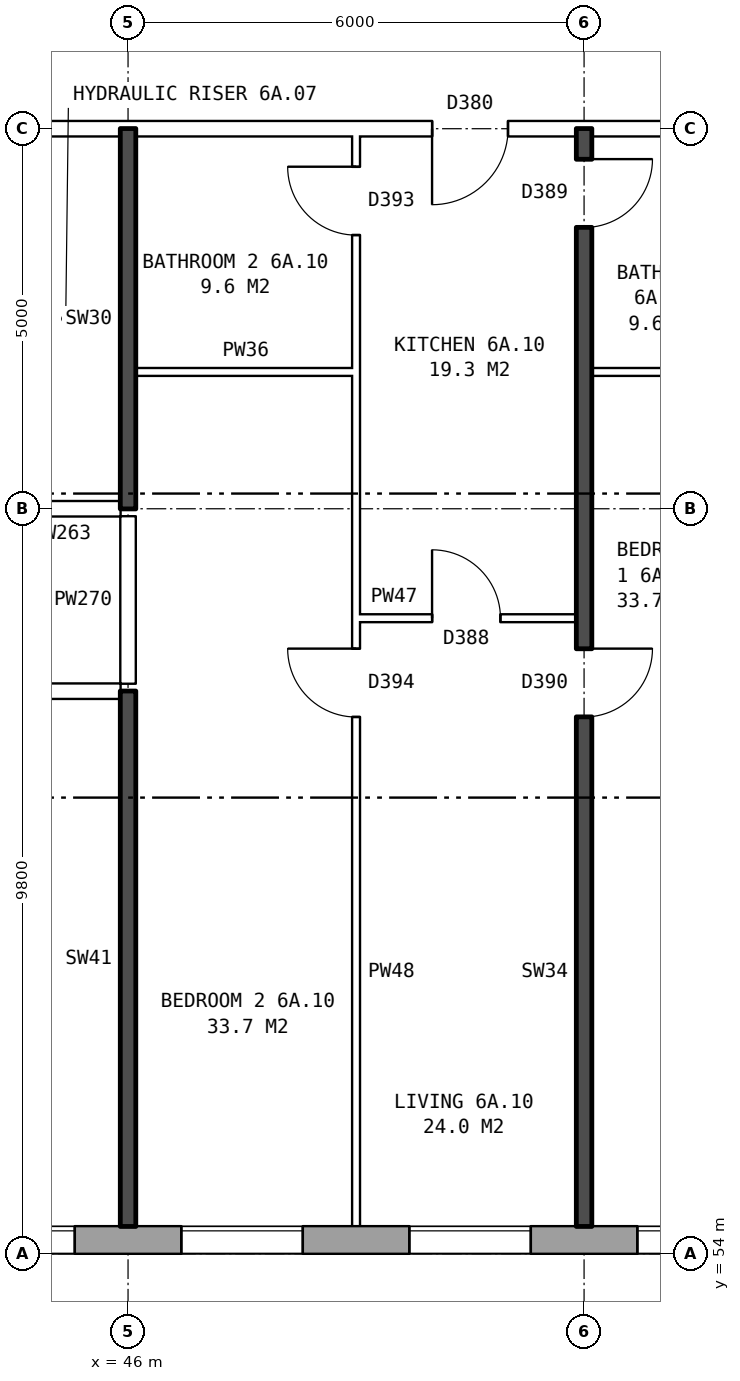
"""IFC4 building model, lengths in metres.
Left out: names, types, materials, properties, quantities, classifications, styles, units other than length and angle.
Written with IfcOpenShell. Run it as: python <this file> out.ifc"""

import sys

from ifc_helpers import new_model, si_unit, direction, frame, frame_2d, origin, place, context, subcontext, project, spatial, rectangle, extrude, element, fill, save


model = new_model("IFC4")
c1 = context("Model", 3, precision=1e-05, world=origin(), true_north=direction((0.0, 1.0)))
c2 = subcontext(c1, "Body", "Model", "MODEL_VIEW")
j1 = project(units=[si_unit("LENGTHUNIT", "METRE"), si_unit("PLANEANGLEUNIT", "RADIAN")], contexts=[c1])
p1 = place(None, origin())
s1 = spatial("IfcSite", under=j1, at=p1, CompositionType="ELEMENT")
p2 = place(p1, origin())
s2 = spatial("IfcBuilding", under=s1, at=p2, CompositionType="ELEMENT")
p3 = place(p2, frame((0.0, 0.0, 25.7)))
s3 = spatial("IfcBuildingStorey", under=s2, at=p3, CompositionType="ELEMENT", Elevation=25.7)
p4 = place(p3, frame((22.825, 54.18, 0.0), z_axis=(0.0, 0.0, 1.0), x_axis=(1.0, 0.0, 0.0)))
e1 = element("IfcWall", 1, at=p4, inside=s3, PredefinedType="STANDARD", context=c2, shape_type="SweptSolid", body=[
    extrude(rectangle(XDim=50.101, YDim=0.36, at=frame_2d((25.05, 0.0))), origin(), (0.0, 0.0, 1.0), 2.85),
])
p5 = place(p4, frame((2.875, 0.0, 0.8)))
e2 = element("IfcOpeningElement", 2, at=p5, cuts=e1, PredefinedType="OPENING", context=c2, shape_type="SweptSolid", body=[
    extrude(rectangle(XDim=1.6, YDim=1.8, at=frame_2d((0.8, 0.9))), frame((0.0, 0.19, 0.0), z_axis=(0.0, -1.0, 0.0), x_axis=(1.0, 0.0, 0.0)), (0.0, 0.0, 1.0), 0.38),
])
p6 = place(p4, frame((5.875, 0.0, 0.8)))
e3 = element("IfcOpeningElement", 3, at=p6, cuts=e1, PredefinedType="OPENING", context=c2, shape_type="SweptSolid", body=[
    extrude(rectangle(XDim=1.6, YDim=1.8, at=frame_2d((0.8, 0.9))), frame((0.0, 0.19, 0.0), z_axis=(0.0, -1.0, 0.0), x_axis=(1.0, 0.0, 0.0)), (0.0, 0.0, 1.0), 0.38),
])
p7 = place(p4, frame((7.775, 0.0, 1.6)))
e4 = element("IfcOpeningElement", 4, at=p7, cuts=e1, PredefinedType="OPENING", context=c2, shape_type="SweptSolid", body=[
    extrude(rectangle(XDim=0.8, YDim=0.9, at=frame_2d((0.4, 0.45))), frame((0.0, 0.19, 0.0), z_axis=(0.0, -1.0, 0.0), x_axis=(1.0, 0.0, 0.0)), (0.0, 0.0, 1.0), 0.38),
])
p8 = place(p4, frame((11.875, 0.0, 0.8)))
e5 = element("IfcOpeningElement", 5, at=p8, cuts=e1, PredefinedType="OPENING", context=c2, shape_type="SweptSolid", body=[
    extrude(rectangle(XDim=1.6, YDim=1.8, at=frame_2d((0.8, 0.9))), frame((0.0, 0.19, 0.0), z_axis=(0.0, -1.0, 0.0), x_axis=(1.0, 0.0, 0.0)), (0.0, 0.0, 1.0), 0.38),
])
p9 = place(p4, frame((14.875, 0.0, 0.8)))
e6 = element("IfcOpeningElement", 6, at=p9, cuts=e1, PredefinedType="OPENING", context=c2, shape_type="SweptSolid", body=[
    extrude(rectangle(XDim=1.6, YDim=1.8, at=frame_2d((0.8, 0.9))), frame((0.0, 0.19, 0.0), z_axis=(0.0, -1.0, 0.0), x_axis=(1.0, 0.0, 0.0)), (0.0, 0.0, 1.0), 0.38),
])
p10 = place(p4, frame((17.875, 0.0, 0.8)))
e7 = element("IfcOpeningElement", 7, at=p10, cuts=e1, PredefinedType="OPENING", context=c2, shape_type="SweptSolid", body=[
    extrude(rectangle(XDim=1.6, YDim=1.8, at=frame_2d((0.8, 0.9))), frame((0.0, 0.19, 0.0), z_axis=(0.0, -1.0, 0.0), x_axis=(1.0, 0.0, 0.0)), (0.0, 0.0, 1.0), 0.38),
])
p11 = place(p4, frame((20.875, 0.0, 0.8)))
e8 = element("IfcOpeningElement", 8, at=p11, cuts=e1, PredefinedType="OPENING", context=c2, shape_type="SweptSolid", body=[
    extrude(rectangle(XDim=1.6, YDim=1.8, at=frame_2d((0.8, 0.9))), frame((0.0, 0.19, 0.0), z_axis=(0.0, -1.0, 0.0), x_axis=(1.0, 0.0, 0.0)), (0.0, 0.0, 1.0), 0.38),
])
p12 = place(p4, frame((23.875, 0.0, 0.8)))
e9 = element("IfcOpeningElement", 9, at=p12, cuts=e1, PredefinedType="OPENING", context=c2, shape_type="SweptSolid", body=[
    extrude(rectangle(XDim=1.6, YDim=1.8, at=frame_2d((0.8, 0.9))), frame((0.0, 0.19, 0.0), z_axis=(0.0, -1.0, 0.0), x_axis=(1.0, 0.0, 0.0)), (0.0, 0.0, 1.0), 0.38),
])
p13 = place(p4, frame((26.875, 0.0, 0.8)))
e10 = element("IfcOpeningElement", 10, at=p13, cuts=e1, PredefinedType="OPENING", context=c2, shape_type="SweptSolid", body=[
    extrude(rectangle(XDim=1.6, YDim=1.8, at=frame_2d((0.8, 0.9))), frame((0.0, 0.19, 0.0), z_axis=(0.0, -1.0, 0.0), x_axis=(1.0, 0.0, 0.0)), (0.0, 0.0, 1.0), 0.38),
])
p14 = place(p4, frame((29.875, 0.0, 0.8)))
e11 = element("IfcOpeningElement", 11, at=p14, cuts=e1, PredefinedType="OPENING", context=c2, shape_type="SweptSolid", body=[
    extrude(rectangle(XDim=1.6, YDim=1.8, at=frame_2d((0.8, 0.9))), frame((0.0, 0.19, 0.0), z_axis=(0.0, -1.0, 0.0), x_axis=(1.0, 0.0, 0.0)), (0.0, 0.0, 1.0), 0.38),
])
p15 = place(p4, frame((32.875, 0.0, 0.8)))
e12 = element("IfcOpeningElement", 12, at=p15, cuts=e1, PredefinedType="OPENING", context=c2, shape_type="SweptSolid", body=[
    extrude(rectangle(XDim=1.6, YDim=1.8, at=frame_2d((0.8, 0.9))), frame((0.0, 0.19, 0.0), z_axis=(0.0, -1.0, 0.0), x_axis=(1.0, 0.0, 0.0)), (0.0, 0.0, 1.0), 0.38),
])
p16 = place(p4, frame((35.875, 0.0, 0.8)))
e13 = element("IfcOpeningElement", 13, at=p16, cuts=e1, PredefinedType="OPENING", context=c2, shape_type="SweptSolid", body=[
    extrude(rectangle(XDim=1.6, YDim=1.8, at=frame_2d((0.8, 0.9))), frame((0.0, 0.19, 0.0), z_axis=(0.0, -1.0, 0.0), x_axis=(1.0, 0.0, 0.0)), (0.0, 0.0, 1.0), 0.38),
])
p17 = place(p4, frame((38.325, 0.0, 0.15)))
e14 = element("IfcOpeningElement", 14, at=p17, cuts=e1, PredefinedType="OPENING", context=c2, shape_type="SweptSolid", body=[
    extrude(rectangle(XDim=1.2, YDim=1.8, at=frame_2d((0.6, 0.9))), frame((0.0, 0.19, 0.0), z_axis=(0.0, -1.0, 0.0), x_axis=(1.0, 0.0, 0.0)), (0.0, 0.0, 1.0), 0.38),
])
p18 = place(p4, frame((41.825, 0.0, 1.4)))
e15 = element("IfcOpeningElement", 15, at=p18, cuts=e1, PredefinedType="OPENING", context=c2, shape_type="SweptSolid", body=[
    extrude(rectangle(XDim=1.0, YDim=1.2, at=frame_2d((0.5, 0.6))), frame((0.0, 0.19, 0.0), z_axis=(0.0, -1.0, 0.0), x_axis=(1.0, 0.0, 0.0)), (0.0, 0.0, 1.0), 0.38),
])
p19 = place(p4, frame((44.875, 0.0, 0.8)))
e16 = element("IfcOpeningElement", 16, at=p19, cuts=e1, PredefinedType="OPENING", context=c2, shape_type="SweptSolid", body=[
    extrude(rectangle(XDim=1.6, YDim=1.8, at=frame_2d((0.8, 0.9))), frame((0.0, 0.19, 0.0), z_axis=(0.0, -1.0, 0.0), x_axis=(1.0, 0.0, 0.0)), (0.0, 0.0, 1.0), 0.38),
])
p20 = place(p4, frame((47.875, 0.0, 0.8)))
e17 = element("IfcOpeningElement", 17, at=p20, cuts=e1, PredefinedType="OPENING", context=c2, shape_type="SweptSolid", body=[
    extrude(rectangle(XDim=1.6, YDim=1.8, at=frame_2d((0.8, 0.9))), frame((0.0, 0.19, 0.0), z_axis=(0.0, -1.0, 0.0), x_axis=(1.0, 0.0, 0.0)), (0.0, 0.0, 1.0), 0.38),
])
p21 = place(p4, frame((10.175, 0.0, 0.8)))
e18 = element("IfcOpeningElement", 18, at=p21, cuts=e1, PredefinedType="OPENING", context=c2, shape_type="SweptSolid", body=[
    extrude(rectangle(XDim=0.8, YDim=0.9, at=frame_2d((0.4, 0.45))), frame((0.0, 0.19, 0.0), z_axis=(0.0, -1.0, 0.0), x_axis=(1.0, 0.0, 0.0)), (0.0, 0.0, 1.0), 0.38),
])
p22 = place(p4, frame((39.825, 0.0, 0.15)))
e19 = element("IfcOpeningElement", 19, at=p22, cuts=e1, PredefinedType="OPENING", context=c2, shape_type="SweptSolid", body=[
    extrude(rectangle(XDim=1.0, YDim=0.9, at=frame_2d((0.5, 0.45))), frame((0.0, 0.19, 0.0), z_axis=(0.0, -1.0, 0.0), x_axis=(1.0, 0.0, 0.0)), (0.0, 0.0, 1.0), 0.38),
])
p23 = place(p4, frame((43.125, 0.0, 0.8)))
e20 = element("IfcOpeningElement", 20, at=p23, cuts=e1, PredefinedType="OPENING", context=c2, shape_type="SweptSolid", body=[
    extrude(rectangle(XDim=1.4, YDim=1.8, at=frame_2d((0.7, 0.9))), frame((0.0, 0.19, 0.0), z_axis=(0.0, -1.0, 0.0), x_axis=(1.0, 0.0, 0.0)), (0.0, 0.0, 1.0), 0.38),
])
p24 = place(p3, frame((20.11, 61.4, 0.0), z_axis=(0.0, 0.0, 1.0), x_axis=(1.0, 0.0, 0.0)))
e21 = element("IfcWall", 21, at=p24, inside=s3, PredefinedType="PARTITIONING", context=c2, shape_type="SweptSolid", body=[
    extrude(rectangle(XDim=25.79, YDim=0.2, at=frame_2d((12.895, 0.0))), origin(), (0.0, 0.0, 1.0), 2.85),
])
p25 = place(p24, frame((22.34, 0.0, 0.0)))
e22 = element("IfcOpeningElement", 22, at=p25, cuts=e21, PredefinedType="OPENING", context=c2, shape_type="SweptSolid", body=[
    extrude(rectangle(XDim=1.0, YDim=2.1, at=frame_2d((0.5, 1.05))), frame((0.0, 0.11, 0.0), z_axis=(0.0, -1.0, 0.0), x_axis=(1.0, 0.0, 0.0)), (0.0, 0.0, 1.0), 0.22),
])
p26 = place(p24, frame((10.39, 0.0, 0.0)))
e23 = element("IfcOpeningElement", 23, at=p26, cuts=e21, PredefinedType="OPENING", context=c2, shape_type="SweptSolid", body=[
    extrude(rectangle(XDim=1.0, YDim=2.1, at=frame_2d((0.5, 1.05))), frame((0.0, 0.11, 0.0), z_axis=(0.0, -1.0, 0.0), x_axis=(1.0, 0.0, 0.0)), (0.0, 0.0, 1.0), 0.22),
])
p27 = place(p24, frame((2.245, 0.0, 0.0)))
e24 = element("IfcOpeningElement", 24, at=p27, cuts=e21, PredefinedType="OPENING", context=c2, shape_type="SweptSolid", body=[
    extrude(rectangle(XDim=1.0, YDim=2.1, at=frame_2d((0.5, 1.05))), frame((0.0, 0.11, 0.0), z_axis=(0.0, -1.0, 0.0), x_axis=(1.0, 0.0, 0.0)), (0.0, 0.0, 1.0), 0.22),
])
p28 = place(p3, frame((49.0, 62.36, 0.0), z_axis=(0.0, 0.0, 1.0), x_axis=(1.0, 0.0, 0.0)))
e25 = element("IfcWall", 25, at=p28, inside=s3, PredefinedType="PARTITIONING", context=c2, shape_type="SweptSolid", body=[
    extrude(rectangle(XDim=2.9, YDim=0.1, at=frame_2d((1.45, 0.0))), origin(), (0.0, 0.0, 1.0), 2.85),
])
p29 = place(p28, frame((1.0, 0.0, 0.0)))
e26 = element("IfcOpeningElement", 26, at=p29, cuts=e25, PredefinedType="OPENING", context=c2, shape_type="SweptSolid", body=[
    extrude(rectangle(XDim=0.9, YDim=2.1, at=frame_2d((0.45, 1.05))), frame((0.0, 0.06, 0.0), z_axis=(0.0, -1.0, 0.0), x_axis=(1.0, 0.0, 0.0)), (0.0, 0.0, 1.0), 0.12),
])
p30 = place(p3, frame((44.36, 63.8, 0.0), z_axis=(0.0, 0.0, 1.0), x_axis=(1.0, 0.0, 0.0)))
e27 = element("IfcWall", 27, at=p30, inside=s3, PredefinedType="PARTITIONING", context=c2, shape_type="SweptSolid", body=[
    extrude(rectangle(XDim=1.54, YDim=0.2, at=frame_2d((0.77, 0.0))), origin(), (0.0, 0.0, 1.0), 2.85),
])
p31 = place(p3, frame((46.1, 65.6, 0.0), z_axis=(0.0, 0.0, 1.0), x_axis=(1.0, 0.0, 0.0)))
e28 = element("IfcWall", 28, at=p31, inside=s3, PredefinedType="PARTITIONING", context=c2, shape_type="SweptSolid", body=[
    extrude(rectangle(XDim=2.9, YDim=0.1, at=frame_2d((1.45, 0.0))), origin(), (0.0, 0.0, 1.0), 2.85),
])
p32 = place(p3, frame((52.1, 65.6, 0.0), z_axis=(0.0, 0.0, 1.0), x_axis=(1.0, 0.0, 0.0)))
e29 = element("IfcWall", 29, at=p32, inside=s3, PredefinedType="PARTITIONING", context=c2, shape_type="SweptSolid", body=[
    extrude(rectangle(XDim=2.8, YDim=0.1, at=frame_2d((1.4, 0.0))), origin(), (0.0, 0.0, 1.0), 2.85),
])
p33 = place(p3, frame((44.36, 68.8, 0.0), z_axis=(0.0, 0.0, 1.0), x_axis=(1.0, 0.0, 0.0)))
e30 = element("IfcWall", 30, at=p33, inside=s3, PredefinedType="PARTITIONING", context=c2, shape_type="SweptSolid", body=[
    extrude(rectangle(XDim=19.28, YDim=0.2, at=frame_2d((9.64, 0.0))), origin(), (0.0, 0.0, 1.0), 2.85),
])
p34 = place(p33, frame((14.64, 0.0, 0.0)))
e31 = element("IfcOpeningElement", 31, at=p34, cuts=e30, PredefinedType="OPENING", context=c2, shape_type="SweptSolid", body=[
    extrude(rectangle(XDim=1.0, YDim=2.1, at=frame_2d((0.5, 1.05))), frame((0.0, 0.11, 0.0), z_axis=(0.0, -1.0, 0.0), x_axis=(1.0, 0.0, 0.0)), (0.0, 0.0, 1.0), 0.22),
])
p35 = place(p33, frame((5.64, 0.0, 0.0)))
e32 = element("IfcOpeningElement", 32, at=p35, cuts=e30, PredefinedType="OPENING", context=c2, shape_type="SweptSolid", body=[
    extrude(rectangle(XDim=1.0, YDim=2.1, at=frame_2d((0.5, 1.05))), frame((0.0, 0.11, 0.0), z_axis=(0.0, -1.0, 0.0), x_axis=(1.0, 0.0, 0.0)), (0.0, 0.0, 1.0), 0.22),
])
p36 = place(p3, frame((46.0, 54.36, 0.0), z_axis=(0.0, 0.0, 1.0), x_axis=(0.0, 1.0, 0.0)))
e33 = element("IfcWall", 33, at=p36, inside=s3, PredefinedType="SOLIDWALL", context=c2, shape_type="SweptSolid", body=[
    extrude(rectangle(XDim=7.04, YDim=0.2, at=frame_2d((3.52, 0.0))), origin(), (0.0, 0.0, 1.0), 2.85),
])
p37 = place(p3, frame((46.0, 61.5, 0.0), z_axis=(0.0, 0.0, 1.0), x_axis=(0.0, 1.0, 0.0)))
e34 = element("IfcWall", 34, at=p37, inside=s3, PredefinedType="PARTITIONING", context=c2, shape_type="SweptSolid", body=[
    extrude(rectangle(XDim=2.2, YDim=0.2, at=frame_2d((1.1, 0.0))), origin(), (0.0, 0.0, 1.0), 2.85),
])
p38 = place(p3, frame((46.0, 63.8, 0.0), z_axis=(0.0, 0.0, 1.0), x_axis=(0.0, 1.0, 0.0)))
e35 = element("IfcWall", 35, at=p38, inside=s3, PredefinedType="SOLIDWALL", context=c2, shape_type="SweptSolid", body=[
    extrude(rectangle(XDim=5.0, YDim=0.2, at=frame_2d((2.5, 0.0))), origin(), (0.0, 0.0, 1.0), 2.85),
])
p39 = place(p3, frame((49.0, 54.36, 0.0), z_axis=(0.0, 0.0, 1.0), x_axis=(0.0, 1.0, 0.0)))
e36 = element("IfcWall", 36, at=p39, inside=s3, PredefinedType="PARTITIONING", context=c2, shape_type="SweptSolid", body=[
    extrude(rectangle(XDim=14.34, YDim=0.1, at=frame_2d((7.17, 0.0))), origin(), (0.0, 0.0, 1.0), 2.85),
])
p40 = place(p39, frame((6.7, 0.0, 0.0)))
e37 = element("IfcOpeningElement", 37, at=p40, cuts=e36, PredefinedType="OPENING", context=c2, shape_type="SweptSolid", body=[
    extrude(rectangle(XDim=0.9, YDim=2.1, at=frame_2d((0.45, 1.05))), frame((0.0, 0.06, 0.0), z_axis=(0.0, -1.0, 0.0), x_axis=(1.0, 0.0, 0.0)), (0.0, 0.0, 1.0), 0.12),
])
p41 = place(p39, frame((13.04, 0.0, 0.0)))
e38 = element("IfcOpeningElement", 38, at=p41, cuts=e36, PredefinedType="OPENING", context=c2, shape_type="SweptSolid", body=[
    extrude(rectangle(XDim=0.9, YDim=2.1, at=frame_2d((0.45, 1.05))), frame((0.0, 0.06, 0.0), z_axis=(0.0, -1.0, 0.0), x_axis=(1.0, 0.0, 0.0)), (0.0, 0.0, 1.0), 0.12),
])
p42 = place(p3, frame((52.0, 54.36, 0.0), z_axis=(0.0, 0.0, 1.0), x_axis=(0.0, 1.0, 0.0)))
e39 = element("IfcWall", 39, at=p42, inside=s3, PredefinedType="SOLIDWALL", context=c2, shape_type="SweptSolid", body=[
    extrude(rectangle(XDim=14.44, YDim=0.2, at=frame_2d((7.22, 0.0))), origin(), (0.0, 0.0, 1.0), 2.85),
])
p43 = place(p42, frame((6.7, 0.0, 0.0)))
e40 = element("IfcOpeningElement", 40, at=p43, cuts=e39, PredefinedType="OPENING", context=c2, shape_type="SweptSolid", body=[
    extrude(rectangle(XDim=0.9, YDim=2.1, at=frame_2d((0.45, 1.05))), frame((0.0, 0.11, 0.0), z_axis=(0.0, -1.0, 0.0), x_axis=(1.0, 0.0, 0.0)), (0.0, 0.0, 1.0), 0.22),
])
p44 = place(p42, frame((13.14, 0.0, 0.0)))
e41 = element("IfcOpeningElement", 41, at=p44, cuts=e39, PredefinedType="OPENING", context=c2, shape_type="SweptSolid", body=[
    extrude(rectangle(XDim=0.9, YDim=2.1, at=frame_2d((0.45, 1.05))), frame((0.0, 0.11, 0.0), z_axis=(0.0, -1.0, 0.0), x_axis=(1.0, 0.0, 0.0)), (0.0, 0.0, 1.0), 0.22),
])
p45 = place(p11, origin())
e42 = element("IfcWindow", 42, at=p45, inside=s3, PartitioningType="SINGLE_PANEL", PredefinedType="WINDOW", context=c2, shape_type="SweptSolid", body=[
    extrude(rectangle(XDim=1.6, YDim=1.8, at=frame_2d((0.8, 0.9))), frame((0.0, 0.15, 0.0), z_axis=(0.0, -1.0, 0.0), x_axis=(1.0, 0.0, 0.0)), (0.0, 0.0, 1.0), 0.06),
])
fill(e8, e42)
p46 = place(p12, origin())
e43 = element("IfcWindow", 43, at=p46, inside=s3, PartitioningType="SINGLE_PANEL", PredefinedType="WINDOW", context=c2, shape_type="SweptSolid", body=[
    extrude(rectangle(XDim=1.6, YDim=1.8, at=frame_2d((0.8, 0.9))), frame((0.0, 0.15, 0.0), z_axis=(0.0, -1.0, 0.0), x_axis=(1.0, 0.0, 0.0)), (0.0, 0.0, 1.0), 0.06),
])
fill(e9, e43)
p47 = place(p13, origin())
e44 = element("IfcWindow", 44, at=p47, inside=s3, PartitioningType="SINGLE_PANEL", PredefinedType="WINDOW", context=c2, shape_type="SweptSolid", body=[
    extrude(rectangle(XDim=1.6, YDim=1.8, at=frame_2d((0.8, 0.9))), frame((0.0, 0.15, 0.0), z_axis=(0.0, -1.0, 0.0), x_axis=(1.0, 0.0, 0.0)), (0.0, 0.0, 1.0), 0.06),
])
fill(e10, e44)
p48 = place(p14, origin())
e45 = element("IfcWindow", 45, at=p48, inside=s3, PartitioningType="SINGLE_PANEL", PredefinedType="WINDOW", context=c2, shape_type="SweptSolid", body=[
    extrude(rectangle(XDim=1.6, YDim=1.8, at=frame_2d((0.8, 0.9))), frame((0.0, 0.15, 0.0), z_axis=(0.0, -1.0, 0.0), x_axis=(1.0, 0.0, 0.0)), (0.0, 0.0, 1.0), 0.06),
])
fill(e11, e45)
p49 = place(p43, frame((0.9, 0.0, 0.0), z_axis=(0.0, 0.0, 1.0), x_axis=(-1.0, 0.0, 0.0)))
e46 = element("IfcDoor", 46, at=p49, inside=s3, OperationType="SINGLE_SWING_LEFT", PredefinedType="DOOR", context=c2, shape_type="SweptSolid", body=[
    extrude(rectangle(XDim=0.9, YDim=2.1, at=frame_2d((0.45, 1.05))), frame((0.0, 0.025, 0.0), z_axis=(0.0, -1.0, 0.0), x_axis=(1.0, 0.0, 0.0)), (0.0, 0.0, 1.0), 0.05),
])
fill(e40, e46)
p50 = place(p40, origin())
e47 = element("IfcDoor", 47, at=p50, inside=s3, OperationType="SINGLE_SWING_RIGHT", PredefinedType="DOOR", context=c2, shape_type="SweptSolid", body=[
    extrude(rectangle(XDim=0.9, YDim=2.1, at=frame_2d((0.45, 1.05))), frame((0.0, 0.025, 0.0), z_axis=(0.0, -1.0, 0.0), x_axis=(1.0, 0.0, 0.0)), (0.0, 0.0, 1.0), 0.05),
])
fill(e37, e47)
p51 = place(p35, frame((1.0, 0.0, 0.0), z_axis=(0.0, 0.0, 1.0), x_axis=(-1.0, 0.0, 0.0)))
e48 = element("IfcDoor", 48, at=p51, inside=s3, OperationType="SINGLE_SWING_RIGHT", PredefinedType="DOOR", context=c2, shape_type="SweptSolid", body=[
    extrude(rectangle(XDim=1.0, YDim=2.1, at=frame_2d((0.5, 1.05))), frame((0.0, 0.025, 0.0), z_axis=(0.0, -1.0, 0.0), x_axis=(1.0, 0.0, 0.0)), (0.0, 0.0, 1.0), 0.05),
])
fill(e32, e48)
p52 = place(p29, origin())
e49 = element("IfcDoor", 49, at=p52, inside=s3, OperationType="SINGLE_SWING_LEFT", PredefinedType="DOOR", context=c2, shape_type="SweptSolid", body=[
    extrude(rectangle(XDim=0.9, YDim=2.1, at=frame_2d((0.45, 1.05))), frame((0.0, 0.025, 0.0), z_axis=(0.0, -1.0, 0.0), x_axis=(1.0, 0.0, 0.0)), (0.0, 0.0, 1.0), 0.05),
])
fill(e26, e49)
p53 = place(p44, frame((0.9, 0.0, 0.0), z_axis=(0.0, 0.0, 1.0), x_axis=(-1.0, 0.0, 0.0)))
e50 = element("IfcDoor", 50, at=p53, inside=s3, OperationType="SINGLE_SWING_LEFT", PredefinedType="DOOR", context=c2, shape_type="SweptSolid", body=[
    extrude(rectangle(XDim=0.9, YDim=2.1, at=frame_2d((0.45, 1.05))), frame((0.0, 0.025, 0.0), z_axis=(0.0, -1.0, 0.0), x_axis=(1.0, 0.0, 0.0)), (0.0, 0.0, 1.0), 0.05),
])
fill(e41, e50)
p54 = place(p41, origin())
e51 = element("IfcDoor", 51, at=p54, inside=s3, OperationType="SINGLE_SWING_RIGHT", PredefinedType="DOOR", context=c2, shape_type="SweptSolid", body=[
    extrude(rectangle(XDim=0.9, YDim=2.1, at=frame_2d((0.45, 1.05))), frame((0.0, 0.025, 0.0), z_axis=(0.0, -1.0, 0.0), x_axis=(1.0, 0.0, 0.0)), (0.0, 0.0, 1.0), 0.05),
])
fill(e38, e51)
save(model, sys.argv[1])
